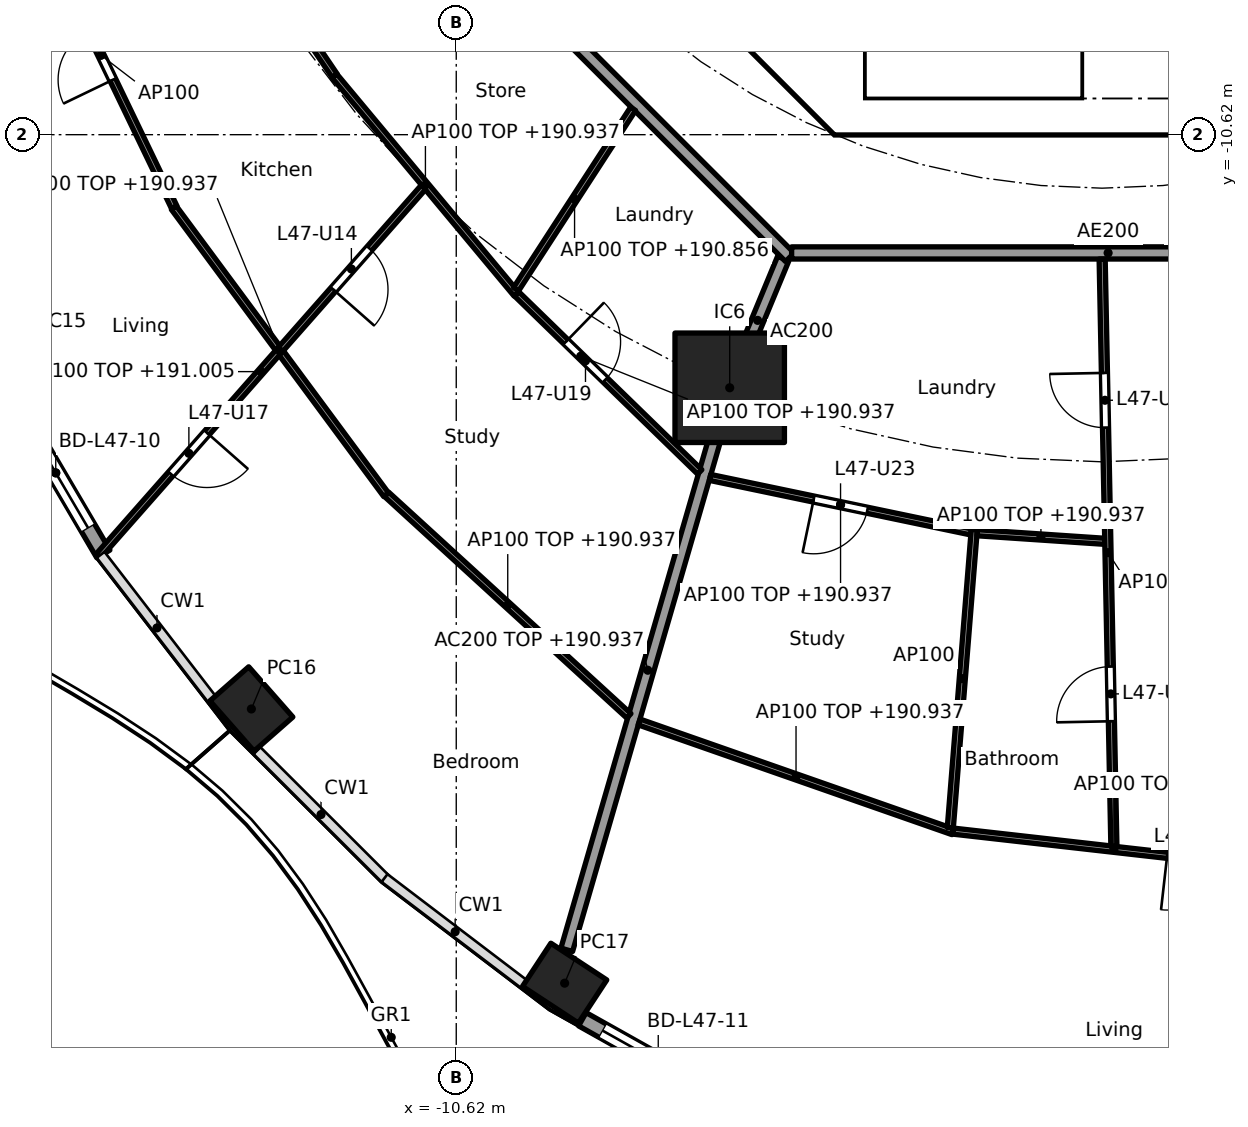
"""IFC4 building model, lengths in metres.
Left out: names, types, materials, properties, quantities, classifications, styles, units other than length and angle.
Written with IfcOpenShell. Run it as: python <this file> out.ifc"""

import sys

from ifc_helpers import new_model, si_unit, direction, frame, frame_2d, origin, origin_2d, place, context, subcontext, project, spatial, polyline, rectangle, hollow_rectangle, outline, extrude, element, fill, save


model = new_model("IFC4")
c1 = context("Model", 3, precision=1e-05, world=origin(), true_north=direction((0.0, 1.0)))
c2 = subcontext(c1, "Body", "Model", "MODEL_VIEW")
j1 = project(units=[si_unit("LENGTHUNIT", "METRE"), si_unit("PLANEANGLEUNIT", "RADIAN")], contexts=[c1])
p1 = place(None, origin())
s1 = spatial("IfcSite", under=j1, at=p1, CompositionType="ELEMENT")
p2 = place(p1, origin())
s2 = spatial("IfcBuilding", under=s1, at=p2, CompositionType="ELEMENT")
p3 = place(p2, frame((0.0, 0.0, 188.1)))
s3 = spatial("IfcBuildingStorey", under=s2, at=p3, CompositionType="ELEMENT", Elevation=188.1)
for number, where, z_axis, x_axis in (
    (1, (-13.989, -20.064, 0.0), (0.0, 0.0, 1.0), (0.66, -0.751, 0.0)),
    (2, (-8.837, -24.573, 0.0), (0.0, 0.0, 1.0), (0.836, -0.549, 0.0)),
):
    element("IfcColumn", number, at=place(p3, frame(where, z_axis=z_axis, x_axis=x_axis)), inside=s3, PredefinedType="COLUMN", context=c2, shape_type="SweptSolid", body=[
        extrude(hollow_rectangle(XDim=1.1, YDim=0.85, WallThickness=0.036, at=origin_2d()), origin(), (0.0, 0.0, 1.0), 3.7),
    ])
p4 = place(p3, frame((-6.123, -14.782, 0.0), z_axis=(0.0, 0.0, 1.0), x_axis=(1.0, 0.0, 0.0)))
e3 = element("IfcColumn", 3, at=p4, inside=s3, PredefinedType="COLUMN", context=c2, shape_type="SweptSolid", body=[
    extrude(rectangle(XDim=1.8, YDim=1.8, at=origin_2d()), origin(), (0.0, 0.0, 1.0), 3.7),
])
p5 = place(p3, frame((-16.424, -17.515, 0.0), z_axis=(0.0, 0.0, 1.0), x_axis=(-0.506309086483, 0.862352079458, 0.0)))
e4 = element("IfcWall", 4, at=p5, inside=s3, PredefinedType="SOLIDWALL", context=c2, shape_type="SweptSolid", body=[
    extrude(rectangle(XDim=3.092, YDim=0.25, at=frame_2d((1.546, 0.0))), origin(), (0.0, 0.0, 1.0), 3.44),
])
p6 = place(p5, frame((0.496, 0.0, 0.0)))
e5 = element("IfcOpeningElement", 5, at=p6, cuts=e4, PredefinedType="OPENING", context=c2, shape_type="SweptSolid", body=[
    extrude(rectangle(XDim=2.1, YDim=2.4, at=frame_2d((1.05, 1.2))), frame((0.0, 0.135, 0.0), z_axis=(0.0, -1.0, 0.0), x_axis=(1.0, 0.0, 0.0)), (0.0, 0.0, 1.0), 0.27),
])
p7 = place(p3, frame((-6.049, -26.568, 0.0), z_axis=(0.0, 0.0, 1.0), x_axis=(-0.872078262455, 0.489366431371, 0.0)))
e6 = element("IfcWall", 6, at=p7, inside=s3, PredefinedType="SOLIDWALL", context=c2, shape_type="SweptSolid", body=[
    extrude(rectangle(XDim=2.864, YDim=0.25, at=frame_2d((1.432, 0.0))), origin(), (0.0, 0.0, 1.0), 3.44),
])
p8 = place(p7, frame((0.382, 0.0, 0.0)))
e7 = element("IfcOpeningElement", 7, at=p8, cuts=e6, PredefinedType="OPENING", context=c2, shape_type="SweptSolid", body=[
    extrude(rectangle(XDim=2.1, YDim=2.4, at=frame_2d((1.05, 1.2))), frame((0.0, 0.135, 0.0), z_axis=(0.0, -1.0, 0.0), x_axis=(1.0, 0.0, 0.0)), (0.0, 0.0, 1.0), 0.27),
])
p9 = place(p3, frame((-9.988, -4.613, 0.0), z_axis=(0.0, 0.0, 1.0), x_axis=(0.707106781187, -0.707106781187, 0.0)))
e8 = element("IfcWall", 8, at=p9, inside=s3, PredefinedType="SHEAR", context=c2, shape_type="SweptSolid", body=[
    extrude(rectangle(XDim=7.602, YDim=0.6, at=frame_2d((3.801, 0.0))), origin(), (0.0, 0.0, 1.0), 3.44),
])
p10 = place(p9, frame((6.151, 0.0, 0.0)))
e9 = element("IfcOpeningElement", 9, at=p10, cuts=e8, PredefinedType="OPENING", context=c2, shape_type="SweptSolid", body=[
    extrude(rectangle(XDim=1.1, YDim=2.1, at=frame_2d((0.55, 1.05))), frame((0.0, 0.31, 0.0), z_axis=(0.0, -1.0, 0.0), x_axis=(1.0, 0.0, 0.0)), (0.0, 0.0, 1.0), 0.62),
])
p11 = place(p3, origin())
e10 = element("IfcWall", 10, at=p11, inside=s3, PredefinedType="SHEAR", context=c2, shape_type="SweptSolid", body=[
    extrude(outline(polyline([(-4.152, -10.025), (4.152, -10.025), (4.401, -9.776), (4.825, -10.2), (4.401, -10.625), (-4.401, -10.625), (-4.825, -10.2), (-4.401, -9.776), (-4.152, -10.025)])), origin(), (0.0, 0.0, 1.0), 3.44),
])
p12 = place(p3, origin())
e11 = element("IfcWall", 11, at=p12, inside=s3, PredefinedType="SOLIDWALL", context=c2, shape_type="SweptSolid", body=[
    extrude(outline(polyline([(-3.9, -10.025), (-4.1, -10.025), (-4.1, -7.025), (-3.9, -7.025), (-3.9, -10.025)])), origin(), (0.0, 0.0, 1.0), 3.44),
])
p13 = place(p3, frame((-5.243, -12.657, 0.0), z_axis=(0.0, 0.0, 1.0), x_axis=(-0.382707856524, -0.923869415315, 0.0)))
e12 = element("IfcWall", 12, at=p13, inside=s3, PredefinedType="PARTITIONING", context=c2, shape_type="SweptSolid", body=[
    extrude(rectangle(XDim=2.2, YDim=0.2, at=frame_2d((1.1, 0.0))), origin(), (0.0, 0.0, 1.0), 3.44),
])
p14 = place(p3, frame((-6.137, -14.83, 0.0), z_axis=(0.0, 0.0, 1.0), x_axis=(-0.278461169897, -0.96044748782, 0.0)))
e13 = element("IfcWall", 13, at=p14, inside=s3, PredefinedType="PARTITIONING", context=c2, shape_type="SweptSolid", body=[
    extrude(rectangle(XDim=9.573, YDim=0.2, at=frame_2d((4.787, 0.0))), origin(), (0.0, 0.0, 1.0), 2.837),
])
p15 = place(p3, frame((-12.635, -5.134, 0.0), z_axis=(0.0, 0.0, 1.0), x_axis=(0.707106781187, -0.707106781187, 0.0)))
e14 = element("IfcWall", 14, at=p15, inside=s3, PredefinedType="PARTITIONING", context=c2, shape_type="SweptSolid", body=[
    extrude(rectangle(XDim=10.609, YDim=0.2, at=frame_2d((5.305, 0.0))), origin(), (0.0, 0.0, 1.0), 3.44),
])
p16 = place(p3, frame((-5.104, -12.565, 0.0), z_axis=(0.0, 0.0, 1.0), x_axis=(1.0, 0.0, 0.0)))
e15 = element("IfcWall", 15, at=p16, inside=s3, PredefinedType="PARTITIONING", context=c2, shape_type="SweptSolid", body=[
    extrude(rectangle(XDim=10.409, YDim=0.2, at=frame_2d((5.205, 0.0))), origin(), (0.0, 0.0, 1.0), 3.44),
])
p17 = place(p16, frame((6.339, 0.0, 0.0)))
e16 = element("IfcOpeningElement", 16, at=p17, cuts=e15, PredefinedType="OPENING", context=c2, shape_type="SweptSolid", body=[
    extrude(rectangle(XDim=1.0, YDim=2.1, at=frame_2d((0.5, 1.05))), frame((0.0, 0.11, 0.0), z_axis=(0.0, -1.0, 0.0), x_axis=(1.0, 0.0, 0.0)), (0.0, 0.0, 1.0), 0.22),
])
p18 = place(p3, frame((-15.008, -6.125, 0.0), z_axis=(0.0, 0.0, 1.0), x_axis=(0.561073758086, -0.827765811076, 0.0)))
e17 = element("IfcWall", 17, at=p18, inside=s3, PredefinedType="PARTITIONING", context=c2, shape_type="SweptSolid", body=[
    extrude(rectangle(XDim=4.259, YDim=0.1, at=frame_2d((2.129, 0.0))), origin(), (0.0, 0.0, 1.0), 3.44),
])
p19 = place(p18, frame((1.704, 0.0, 0.0)))
e18 = element("IfcOpeningElement", 18, at=p19, cuts=e17, PredefinedType="OPENING", context=c2, shape_type="SweptSolid", body=[
    extrude(rectangle(XDim=0.9, YDim=2.1, at=frame_2d((0.45, 1.05))), frame((0.0, 0.06, 0.0), z_axis=(0.0, -1.0, 0.0), x_axis=(1.0, 0.0, 0.0)), (0.0, 0.0, 1.0), 0.12),
])
p20 = place(p3, frame((-17.669, -6.809, 0.0), z_axis=(0.0, 0.0, 1.0), x_axis=(0.434040130629, -0.900893536997, 0.0)))
e19 = element("IfcWall", 19, at=p20, inside=s3, PredefinedType="PARTITIONING", context=c2, shape_type="SweptSolid", body=[
    extrude(rectangle(XDim=5.558, YDim=0.1, at=frame_2d((2.779, 0.0))), origin(), (0.0, 0.0, 1.0), 3.44),
])
p21 = place(p20, frame((2.329, 0.0, 0.0)))
e20 = element("IfcOpeningElement", 20, at=p21, cuts=e19, PredefinedType="OPENING", context=c2, shape_type="SweptSolid", body=[
    extrude(rectangle(XDim=0.9, YDim=2.1, at=frame_2d((0.45, 1.05))), frame((0.0, 0.06, 0.0), z_axis=(0.0, -1.0, 0.0), x_axis=(1.0, 0.0, 0.0)), (0.0, 0.0, 1.0), 0.12),
])
p22 = place(p3, frame((-12.623, -9.653, 0.0), z_axis=(0.0, 0.0, 1.0), x_axis=(0.640297481347, -0.768127030758, 0.0)))
e21 = element("IfcWall", 21, at=p22, inside=s3, PredefinedType="PARTITIONING", context=c2, shape_type="SweptSolid", body=[
    extrude(rectangle(XDim=4.672, YDim=0.1, at=frame_2d((2.336, 0.0))), origin(), (0.0, 0.0, 1.0), 2.837),
])
p23 = place(p3, frame((-15.265, -11.821, 0.0), z_axis=(0.0, 0.0, 1.0), x_axis=(0.594711348772, -0.803939308432, 0.0)))
e22 = element("IfcWall", 22, at=p23, inside=s3, PredefinedType="PARTITIONING", context=c2, shape_type="SweptSolid", body=[
    extrude(rectangle(XDim=5.872, YDim=0.1, at=frame_2d((2.936, 0.0))), origin(), (0.0, 0.0, 1.0), 2.837),
])
p24 = place(p3, frame((-11.16, -11.485, 0.0), z_axis=(0.0, 0.0, 1.0), x_axis=(-0.661275898802, -0.750142776852, 0.0)))
e23 = element("IfcWall", 23, at=p24, inside=s3, PredefinedType="PARTITIONING", context=c2, shape_type="SweptSolid", body=[
    extrude(rectangle(XDim=8.083, YDim=0.1, at=frame_2d((4.041, 0.0))), origin(), (0.0, 0.0, 1.0), 2.905),
])
p25 = place(p24, frame((1.341, 0.0, 0.0)))
e24 = element("IfcOpeningElement", 24, at=p25, cuts=e23, PredefinedType="OPENING", context=c2, shape_type="SweptSolid", body=[
    extrude(rectangle(XDim=0.9, YDim=2.1, at=frame_2d((0.45, 1.05))), frame((0.0, 0.06, 0.0), z_axis=(0.0, -1.0, 0.0), x_axis=(1.0, 0.0, 0.0)), (0.0, 0.0, 1.0), 0.12),
])
p26 = place(p24, frame((5.382, 0.0, 0.0)))
e25 = element("IfcOpeningElement", 25, at=p26, cuts=e23, PredefinedType="OPENING", context=c2, shape_type="SweptSolid", body=[
    extrude(rectangle(XDim=0.9, YDim=2.1, at=frame_2d((0.45, 1.05))), frame((0.0, 0.06, 0.0), z_axis=(0.0, -1.0, 0.0), x_axis=(1.0, 0.0, 0.0)), (0.0, 0.0, 1.0), 0.12),
])
p27 = place(p3, frame((-7.712, -10.195, 0.0), z_axis=(0.0, 0.0, 1.0), x_axis=(-0.544170086001, -0.838974920663, 0.0)))
e26 = element("IfcWall", 26, at=p27, inside=s3, PredefinedType="PARTITIONING", context=c2, shape_type="SweptSolid", body=[
    extrude(rectangle(XDim=3.535, YDim=0.1, at=frame_2d((1.768, 0.0))), origin(), (0.0, 0.0, 1.0), 2.756),
])
p28 = place(p3, frame((-9.627, -13.238, 0.0), z_axis=(0.0, 0.0, 1.0), x_axis=(0.716919058692, -0.697156412352, 0.0)))
e27 = element("IfcWall", 27, at=p28, inside=s3, PredefinedType="PARTITIONING", context=c2, shape_type="SweptSolid", body=[
    extrude(rectangle(XDim=4.2, YDim=0.1, at=frame_2d((2.1, 0.0))), origin(), (0.0, 0.0, 1.0), 2.837),
])
p29 = place(p28, frame((1.13, 0.0, 0.0)))
e28 = element("IfcOpeningElement", 28, at=p29, cuts=e27, PredefinedType="OPENING", context=c2, shape_type="SweptSolid", body=[
    extrude(rectangle(XDim=0.9, YDim=2.1, at=frame_2d((0.45, 1.05))), frame((0.0, 0.06, 0.0), z_axis=(0.0, -1.0, 0.0), x_axis=(1.0, 0.0, 0.0)), (0.0, 0.0, 1.0), 0.12),
])
p30 = place(p3, frame((-11.766, -16.535, 0.0), z_axis=(0.0, 0.0, 1.0), x_axis=(0.73807320557, -0.674720640872, 0.0)))
e29 = element("IfcWall", 29, at=p30, inside=s3, PredefinedType="PARTITIONING", context=c2, shape_type="SweptSolid", body=[
    extrude(rectangle(XDim=5.399, YDim=0.1, at=frame_2d((2.699, 0.0))), origin(), (0.0, 0.0, 1.0), 2.837),
])
p31 = place(p3, frame((-6.447, -16.256, 0.0), z_axis=(0.0, 0.0, 1.0), x_axis=(0.978906251581, -0.204309937631, 0.0)))
e30 = element("IfcWall", 30, at=p31, inside=s3, PredefinedType="PARTITIONING", context=c2, shape_type="SweptSolid", body=[
    extrude(rectangle(XDim=4.385, YDim=0.1, at=frame_2d((2.193, 0.0))), origin(), (0.0, 0.0, 1.0), 2.837),
])
p32 = place(p31, frame((1.743, 0.0, 0.0)))
e31 = element("IfcOpeningElement", 31, at=p32, cuts=e30, PredefinedType="OPENING", context=c2, shape_type="SweptSolid", body=[
    extrude(rectangle(XDim=0.9, YDim=2.1, at=frame_2d((0.45, 1.05))), frame((0.0, 0.06, 0.0), z_axis=(0.0, -1.0, 0.0), x_axis=(1.0, 0.0, 0.0)), (0.0, 0.0, 1.0), 0.12),
])
p33 = place(p3, frame((-7.613, -20.278, 0.0), z_axis=(0.0, 0.0, 1.0), x_axis=(0.943918212431, -0.330179357684, 0.0)))
e32 = element("IfcWall", 32, at=p33, inside=s3, PredefinedType="PARTITIONING", context=c2, shape_type="SweptSolid", body=[
    extrude(rectangle(XDim=5.467, YDim=0.1, at=frame_2d((2.734, 0.0))), origin(), (0.0, 0.0, 1.0), 2.837),
])
p34 = place(p3, frame((-2.101, -17.113, 0.0), z_axis=(0.0, 0.0, 1.0), x_axis=(-0.080183022299, -0.996780157776, 0.0)))
e33 = element("IfcWall", 33, at=p34, inside=s3, PredefinedType="PARTITIONING", context=c2, shape_type="SweptSolid", body=[
    extrude(rectangle(XDim=4.92, YDim=0.1, at=frame_2d((2.46, 0.0))), origin(), (0.0, 0.0, 1.0), 3.44),
])
p35 = place(p3, frame((-2.055, -17.166, 0.0), z_axis=(0.0, 0.0, 1.0), x_axis=(0.997756833447, -0.06694252243, 0.0)))
e34 = element("IfcWall", 34, at=p35, inside=s3, PredefinedType="PARTITIONING", context=c2, shape_type="SweptSolid", body=[
    extrude(rectangle(XDim=2.104, YDim=0.1, at=frame_2d((1.052, 0.0))), origin(), (0.0, 0.0, 1.0), 2.837),
])
p36 = place(p3, frame((-2.449, -22.073, 0.0), z_axis=(0.0, 0.0, 1.0), x_axis=(0.993660315081, -0.112424099879, 0.0)))
e35 = element("IfcWall", 35, at=p36, inside=s3, PredefinedType="PARTITIONING", context=c2, shape_type="SweptSolid", body=[
    extrude(rectangle(XDim=5.325, YDim=0.1, at=frame_2d((2.662, 0.0))), origin(), (0.0, 0.0, 1.0), 2.837),
])
p37 = place(p36, frame((3.544, 0.0, 0.0)))
e36 = element("IfcOpeningElement", 36, at=p37, cuts=e35, PredefinedType="OPENING", context=c2, shape_type="SweptSolid", body=[
    extrude(rectangle(XDim=0.9, YDim=2.1, at=frame_2d((0.45, 1.05))), frame((0.0, 0.06, 0.0), z_axis=(0.0, -1.0, 0.0), x_axis=(1.0, 0.0, 0.0)), (0.0, 0.0, 1.0), 0.12),
])
p38 = place(p3, frame((0.002, -12.665, 0.0), z_axis=(0.0, 0.0, 1.0), x_axis=(0.019992969345, -0.999800120613, 0.0)))
e37 = element("IfcWall", 37, at=p38, inside=s3, PredefinedType="PARTITIONING", context=c2, shape_type="SweptSolid", body=[
    extrude(rectangle(XDim=9.659, YDim=0.1, at=frame_2d((4.83, 0.0))), origin(), (0.0, 0.0, 1.0), 2.756),
])
p39 = place(p38, frame((1.873, 0.0, 0.0)))
e38 = element("IfcOpeningElement", 38, at=p39, cuts=e37, PredefinedType="OPENING", context=c2, shape_type="SweptSolid", body=[
    extrude(rectangle(XDim=0.9, YDim=2.1, at=frame_2d((0.45, 1.05))), frame((0.0, 0.06, 0.0), z_axis=(0.0, -1.0, 0.0), x_axis=(1.0, 0.0, 0.0)), (0.0, 0.0, 1.0), 0.12),
])
p40 = place(p38, frame((6.703, 0.0, 0.0)))
e39 = element("IfcOpeningElement", 39, at=p40, cuts=e37, PredefinedType="OPENING", context=c2, shape_type="SweptSolid", body=[
    extrude(rectangle(XDim=0.9, YDim=2.1, at=frame_2d((0.45, 1.05))), frame((0.0, 0.06, 0.0), z_axis=(0.0, -1.0, 0.0), x_axis=(1.0, 0.0, 0.0)), (0.0, 0.0, 1.0), 0.12),
])
p41 = place(p6, origin())
e40 = element("IfcDoor", 40, at=p41, inside=s3, OperationType="SLIDING_TO_LEFT", PredefinedType="DOOR", context=c2, shape_type="SweptSolid", body=[
    extrude(rectangle(XDim=2.1, YDim=2.4, at=frame_2d((1.05, 1.2))), frame((0.0, 0.025, 0.0), z_axis=(0.0, -1.0, 0.0), x_axis=(1.0, 0.0, 0.0)), (0.0, 0.0, 1.0), 0.05),
])
fill(e5, e40)
p42 = place(p8, origin())
e41 = element("IfcDoor", 41, at=p42, inside=s3, OperationType="SLIDING_TO_LEFT", PredefinedType="DOOR", context=c2, shape_type="SweptSolid", body=[
    extrude(rectangle(XDim=2.1, YDim=2.4, at=frame_2d((1.05, 1.2))), frame((0.0, 0.025, 0.0), z_axis=(0.0, -1.0, 0.0), x_axis=(1.0, 0.0, 0.0)), (0.0, 0.0, 1.0), 0.05),
])
fill(e7, e41)
p43 = place(p10, origin())
e42 = element("IfcDoor", 42, at=p43, inside=s3, OperationType="SINGLE_SWING_RIGHT", PredefinedType="DOOR", context=c2, shape_type="SweptSolid", body=[
    extrude(rectangle(XDim=1.1, YDim=2.1, at=frame_2d((0.55, 1.05))), frame((0.0, 0.025, 0.0), z_axis=(0.0, -1.0, 0.0), x_axis=(1.0, 0.0, 0.0)), (0.0, 0.0, 1.0), 0.05),
])
fill(e9, e42)
p44 = place(p25, origin())
e43 = element("IfcDoor", 43, at=p44, inside=s3, OperationType="SINGLE_SWING_RIGHT", PredefinedType="DOOR", context=c2, shape_type="SweptSolid", body=[
    extrude(rectangle(XDim=0.9, YDim=2.1, at=frame_2d((0.45, 1.05))), frame((0.0, 0.025, 0.0), z_axis=(0.0, -1.0, 0.0), x_axis=(1.0, 0.0, 0.0)), (0.0, 0.0, 1.0), 0.05),
])
fill(e24, e43)
p45 = place(p21, frame((0.9, 0.0, 0.0), x_axis=(-1.0, 0.0, 0.0)))
e44 = element("IfcDoor", 44, at=p45, inside=s3, OperationType="SINGLE_SWING_LEFT", PredefinedType="DOOR", context=c2, shape_type="SweptSolid", body=[
    extrude(rectangle(XDim=0.9, YDim=2.1, at=frame_2d((0.45, 1.05))), frame((0.0, 0.025, 0.0), z_axis=(0.0, -1.0, 0.0), x_axis=(1.0, 0.0, 0.0)), (0.0, 0.0, 1.0), 0.05),
])
fill(e20, e44)
p46 = place(p26, origin())
e45 = element("IfcDoor", 45, at=p46, inside=s3, OperationType="SINGLE_SWING_LEFT", PredefinedType="DOOR", context=c2, shape_type="SweptSolid", body=[
    extrude(rectangle(XDim=0.9, YDim=2.1, at=frame_2d((0.45, 1.05))), frame((0.0, 0.025, 0.0), z_axis=(0.0, -1.0, 0.0), x_axis=(1.0, 0.0, 0.0)), (0.0, 0.0, 1.0), 0.05),
])
fill(e25, e45)
p47 = place(p29, origin())
e46 = element("IfcDoor", 46, at=p47, inside=s3, OperationType="SINGLE_SWING_LEFT", PredefinedType="DOOR", context=c2, shape_type="SweptSolid", body=[
    extrude(rectangle(XDim=0.9, YDim=2.1, at=frame_2d((0.45, 1.05))), frame((0.0, 0.025, 0.0), z_axis=(0.0, -1.0, 0.0), x_axis=(1.0, 0.0, 0.0)), (0.0, 0.0, 1.0), 0.05),
])
fill(e28, e46)
p48 = place(p39, frame((0.9, 0.0, 0.0), x_axis=(-1.0, 0.0, 0.0)))
e47 = element("IfcDoor", 47, at=p48, inside=s3, OperationType="SINGLE_SWING_RIGHT", PredefinedType="DOOR", context=c2, shape_type="SweptSolid", body=[
    extrude(rectangle(XDim=0.9, YDim=2.1, at=frame_2d((0.45, 1.05))), frame((0.0, 0.025, 0.0), z_axis=(0.0, -1.0, 0.0), x_axis=(1.0, 0.0, 0.0)), (0.0, 0.0, 1.0), 0.05),
])
fill(e38, e47)
p49 = place(p32, frame((0.9, 0.0, 0.0), x_axis=(-1.0, 0.0, 0.0)))
e48 = element("IfcDoor", 48, at=p49, inside=s3, OperationType="SINGLE_SWING_RIGHT", PredefinedType="DOOR", context=c2, shape_type="SweptSolid", body=[
    extrude(rectangle(XDim=0.9, YDim=2.1, at=frame_2d((0.45, 1.05))), frame((0.0, 0.025, 0.0), z_axis=(0.0, -1.0, 0.0), x_axis=(1.0, 0.0, 0.0)), (0.0, 0.0, 1.0), 0.05),
])
fill(e31, e48)
p50 = place(p40, frame((0.9, 0.0, 0.0), x_axis=(-1.0, 0.0, 0.0)))
e49 = element("IfcDoor", 49, at=p50, inside=s3, OperationType="SINGLE_SWING_LEFT", PredefinedType="DOOR", context=c2, shape_type="SweptSolid", body=[
    extrude(rectangle(XDim=0.9, YDim=2.1, at=frame_2d((0.45, 1.05))), frame((0.0, 0.025, 0.0), z_axis=(0.0, -1.0, 0.0), x_axis=(1.0, 0.0, 0.0)), (0.0, 0.0, 1.0), 0.05),
])
fill(e39, e49)
p51 = place(p37, frame((0.9, 0.0, 0.0), x_axis=(-1.0, 0.0, 0.0)))
e50 = element("IfcDoor", 50, at=p51, inside=s3, OperationType="SINGLE_SWING_RIGHT", PredefinedType="DOOR", context=c2, shape_type="SweptSolid", body=[
    extrude(rectangle(XDim=0.9, YDim=2.1, at=frame_2d((0.45, 1.05))), frame((0.0, 0.025, 0.0), z_axis=(0.0, -1.0, 0.0), x_axis=(1.0, 0.0, 0.0)), (0.0, 0.0, 1.0), 0.05),
])
fill(e36, e50)
save(model, sys.argv[1])
